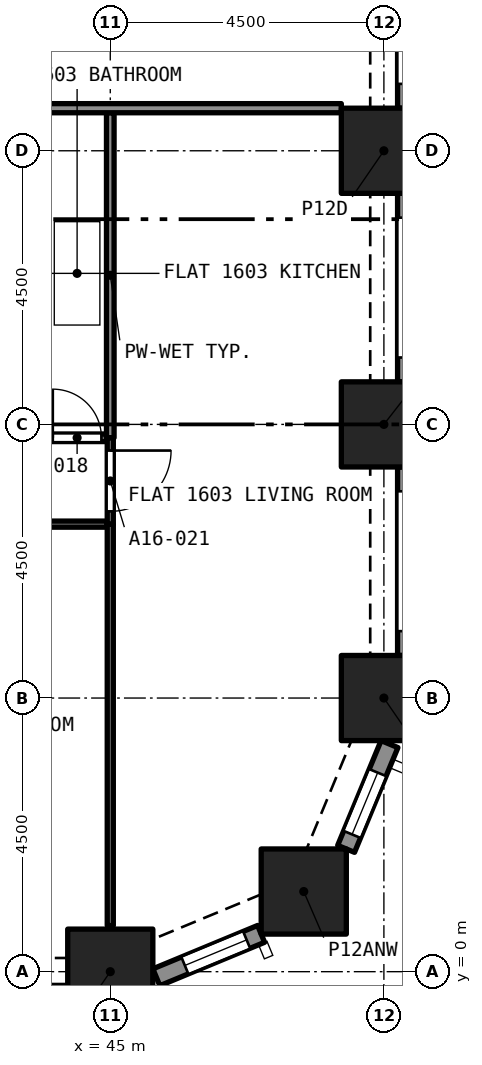
"""IFC4 building model, lengths in metres.
Left out: names, types, materials, properties, quantities, classifications, styles, units other than length and angle.
Written with IfcOpenShell. Run it as: python <this file> out.ifc"""

import sys

from ifc_helpers import new_model, si_unit, direction, frame, frame_2d, origin, origin_2d, place, context, subcontext, project, spatial, rectangle, extrude, element, fill, save


model = new_model("IFC4")
c1 = context("Model", 3, precision=1e-05, world=origin(), true_north=direction((0.0, 1.0)))
c2 = subcontext(c1, "Body", "Model", "MODEL_VIEW")
j1 = project(units=[si_unit("LENGTHUNIT", "METRE"), si_unit("PLANEANGLEUNIT", "RADIAN")], contexts=[c1])
p1 = place(None, origin())
s1 = spatial("IfcSite", under=j1, at=p1, CompositionType="ELEMENT")
p2 = place(p1, origin())
s2 = spatial("IfcBuilding", under=s1, at=p2, CompositionType="ELEMENT")
p3 = place(p2, frame((0.0, 0.0, 62.4)))
s3 = spatial("IfcBuildingStorey", under=s2, at=p3, CompositionType="ELEMENT", Elevation=62.4)
for number, where, z_axis, x_axis in (
    (1, (45.0, 0.0, 0.0), (0.0, 0.0, 1.0), (1.0, 0.0, 0.0)),
    (2, (48.182, 1.318, 0.0), (0.0, 0.0, 1.0), (1.0, 0.0, 0.0)),
    (3, (49.5, 4.5, 0.0), (0.0, 0.0, 1.0), (1.0, 0.0, 0.0)),
    (4, (49.5, 9.0, 0.0), (0.0, 0.0, 1.0), (1.0, 0.0, 0.0)),
    (5, (49.5, 13.5, 0.0), (0.0, 0.0, 1.0), (1.0, 0.0, 0.0)),
):
    element("IfcColumn", number, at=place(p3, frame(where, z_axis=z_axis, x_axis=x_axis)), inside=s3, PredefinedType="COLUMN", context=c2, shape_type="SweptSolid", body=[
        extrude(rectangle(XDim=1.4, YDim=1.4, at=origin_2d()), origin(), (0.0, 0.0, 1.0), 3.2),
    ])
p4 = place(p3, frame((47.48, 0.622, 0.0), z_axis=(0.0, 0.0, 1.0), x_axis=(-0.923903565336, -0.38262540684, 0.0)))
e6 = element("IfcWall", 6, at=p4, inside=s3, PredefinedType="SOLIDWALL", context=c2, shape_type="SweptSolid", body=[
    extrude(rectangle(XDim=1.865, YDim=0.3, at=frame_2d((0.933, 0.0))), origin(), (0.0, 0.0, 1.0), 3.2),
])
p5 = place(p4, frame((0.258, 0.0, 0.45)))
e7 = element("IfcOpeningElement", 7, at=p5, cuts=e6, PredefinedType="OPENING", context=c2, shape_type="SweptSolid", body=[
    extrude(rectangle(XDim=1.1, YDim=1.95, at=frame_2d((0.55, 0.975))), frame((0.0, 0.16, 0.0), z_axis=(0.0, -1.0, 0.0), x_axis=(1.0, 0.0, 0.0)), (0.0, 0.0, 1.0), 0.32),
])
p6 = place(p3, frame((49.592, 3.743, 0.0), z_axis=(0.0, 0.0, 1.0), x_axis=(-0.382737135771, -0.923857286003, 0.0)))
e8 = element("IfcWall", 8, at=p6, inside=s3, PredefinedType="SOLIDWALL", context=c2, shape_type="SweptSolid", body=[
    extrude(rectangle(XDim=1.865, YDim=0.3, at=frame_2d((0.933, 0.0))), origin(), (0.0, 0.0, 1.0), 3.2),
])
p7 = place(p6, frame((0.508, 0.0, 0.45)))
e9 = element("IfcOpeningElement", 9, at=p7, cuts=e8, PredefinedType="OPENING", context=c2, shape_type="SweptSolid", body=[
    extrude(rectangle(XDim=1.1, YDim=1.95, at=frame_2d((0.55, 0.975))), frame((0.0, 0.16, 0.0), z_axis=(0.0, -1.0, 0.0), x_axis=(1.0, 0.0, 0.0)), (0.0, 0.0, 1.0), 0.32),
])
p8 = place(p3, frame((49.875, 8.3, 0.0), z_axis=(0.0, 0.0, 1.0), x_axis=(0.0, -1.0, 0.0)))
e10 = element("IfcWall", 10, at=p8, inside=s3, PredefinedType="SOLIDWALL", context=c2, shape_type="SweptSolid", body=[
    extrude(rectangle(XDim=3.1, YDim=0.3, at=frame_2d((1.55, 0.0))), origin(), (0.0, 0.0, 1.0), 3.2),
])
p9 = place(p8, frame((0.4, 0.0, 0.45)))
e11 = element("IfcOpeningElement", 11, at=p9, cuts=e10, PredefinedType="OPENING", context=c2, shape_type="SweptSolid", body=[
    extrude(rectangle(XDim=2.3, YDim=1.95, at=frame_2d((1.15, 0.975))), frame((0.0, 0.16, 0.0), z_axis=(0.0, -1.0, 0.0), x_axis=(1.0, 0.0, 0.0)), (0.0, 0.0, 1.0), 0.32),
])
p10 = place(p3, frame((49.875, 12.8, 0.0), z_axis=(0.0, 0.0, 1.0), x_axis=(0.0, -1.0, 0.0)))
e12 = element("IfcWall", 12, at=p10, inside=s3, PredefinedType="SOLIDWALL", context=c2, shape_type="SweptSolid", body=[
    extrude(rectangle(XDim=3.1, YDim=0.3, at=frame_2d((1.55, 0.0))), origin(), (0.0, 0.0, 1.0), 3.2),
])
p11 = place(p10, frame((0.4, 0.0, 0.45)))
e13 = element("IfcOpeningElement", 13, at=p11, cuts=e12, PredefinedType="OPENING", context=c2, shape_type="SweptSolid", body=[
    extrude(rectangle(XDim=2.3, YDim=1.95, at=frame_2d((1.15, 0.975))), frame((0.0, 0.16, 0.0), z_axis=(0.0, -1.0, 0.0), x_axis=(1.0, 0.0, 0.0)), (0.0, 0.0, 1.0), 0.32),
])
p12 = place(p3, frame((49.875, 17.3, 0.0), z_axis=(0.0, 0.0, 1.0), x_axis=(0.0, -1.0, 0.0)))
e14 = element("IfcWall", 14, at=p12, inside=s3, PredefinedType="SOLIDWALL", context=c2, shape_type="SweptSolid", body=[
    extrude(rectangle(XDim=3.1, YDim=0.3, at=frame_2d((1.55, 0.0))), origin(), (0.0, 0.0, 1.0), 3.2),
])
p13 = place(p12, frame((0.4, 0.0, 0.45)))
e15 = element("IfcOpeningElement", 15, at=p13, cuts=e14, PredefinedType="OPENING", context=c2, shape_type="SweptSolid", body=[
    extrude(rectangle(XDim=2.3, YDim=1.95, at=frame_2d((1.15, 0.975))), frame((0.0, 0.16, 0.0), z_axis=(0.0, -1.0, 0.0), x_axis=(1.0, 0.0, 0.0)), (0.0, 0.0, 1.0), 0.32),
])
p14 = place(p3, frame((43.909, 8.78, 0.0), z_axis=(0.0, 0.0, 1.0), x_axis=(1.0, 0.0, 0.0)))
e16 = element("IfcWall", 16, at=p14, inside=s3, PredefinedType="PARTITIONING", context=c2, shape_type="SweptSolid", body=[
    extrude(rectangle(XDim=1.028, YDim=0.125, at=frame_2d((0.514, 0.0))), origin(), (0.0, 0.0, 1.0), 2.9),
])
p15 = place(p14, frame((0.146, 0.0, 0.0)))
e17 = element("IfcOpeningElement", 17, at=p15, cuts=e16, PredefinedType="OPENING", context=c2, shape_type="SweptSolid", body=[
    extrude(rectangle(XDim=0.8, YDim=2.1, at=frame_2d((0.4, 1.05))), frame((0.0, 0.073, 0.0), z_axis=(0.0, -1.0, 0.0), x_axis=(1.0, 0.0, 0.0)), (0.0, 0.0, 1.0), 0.145),
])
p16 = place(p3, frame((45.0, 8.78, 0.0), z_axis=(0.0, 0.0, 1.0), x_axis=(0.0, 1.0, 0.0)))
e18 = element("IfcWall", 18, at=p16, inside=s3, PredefinedType="PARTITIONING", context=c2, shape_type="SweptSolid", body=[
    extrude(rectangle(XDim=5.345, YDim=0.125, at=frame_2d((2.672, 0.0))), origin(), (0.0, 0.0, 1.0), 2.9),
])
p17 = place(p3, frame((44.95, 7.36, 0.0), z_axis=(0.0, 0.0, 1.0), x_axis=(-1.0, 0.0, 0.0)))
e19 = element("IfcWall", 19, at=p17, inside=s3, PredefinedType="PARTITIONING", context=c2, shape_type="SweptSolid", body=[
    extrude(rectangle(XDim=4.35, YDim=0.1, at=frame_2d((2.175, 0.0))), origin(), (0.0, 0.0, 1.0), 2.9),
])
p18 = place(p17, frame((1.75, 0.0, 0.0)))
e20 = element("IfcOpeningElement", 20, at=p18, cuts=e19, PredefinedType="OPENING", context=c2, shape_type="SweptSolid", body=[
    extrude(rectangle(XDim=0.9, YDim=2.1, at=frame_2d((0.45, 1.05))), frame((0.0, 0.06, 0.0), z_axis=(0.0, -1.0, 0.0), x_axis=(1.0, 0.0, 0.0)), (0.0, 0.0, 1.0), 0.12),
])
p19 = place(p3, frame((45.0, 0.758, 0.0), z_axis=(0.0, 0.0, 1.0), x_axis=(0.0, 1.0, 0.0)))
e21 = element("IfcWall", 21, at=p19, inside=s3, PredefinedType="PARTITIONING", context=c2, shape_type="SweptSolid", body=[
    extrude(rectangle(XDim=6.603, YDim=0.1, at=frame_2d((3.301, 0.0))), origin(), (0.0, 0.0, 1.0), 2.9),
])
p20 = place(p3, frame((45.0, 8.78, 0.0), z_axis=(0.0, 0.0, 1.0), x_axis=(0.0, -1.0, 0.0)))
e22 = element("IfcWall", 22, at=p20, inside=s3, PredefinedType="PARTITIONING", context=c2, shape_type="SweptSolid", body=[
    extrude(rectangle(XDim=1.42, YDim=0.1, at=frame_2d((0.71, 0.0))), origin(), (0.0, 0.0, 1.0), 2.9),
])
p21 = place(p20, frame((0.21, 0.0, 0.0)))
e23 = element("IfcOpeningElement", 23, at=p21, cuts=e22, PredefinedType="OPENING", context=c2, shape_type="SweptSolid", body=[
    extrude(rectangle(XDim=1.0, YDim=2.1, at=frame_2d((0.5, 1.05))), frame((0.0, 0.06, 0.0), z_axis=(0.0, -1.0, 0.0), x_axis=(1.0, 0.0, 0.0)), (0.0, 0.0, 1.0), 0.12),
])
p22 = place(p3, frame((42.6, 14.2, 0.0), z_axis=(0.0, 0.0, 1.0), x_axis=(1.0, 0.0, 0.0)))
e24 = element("IfcWall", 24, at=p22, inside=s3, PredefinedType="PARTITIONING", context=c2, shape_type="SweptSolid", body=[
    extrude(rectangle(XDim=6.2, YDim=0.15, at=frame_2d((3.1, 0.0))), origin(), (0.0, 0.0, 1.0), 2.9),
])
p23 = place(p5, origin())
e25 = element("IfcWindow", 25, at=p23, inside=s3, PartitioningType="SINGLE_PANEL", PredefinedType="WINDOW", context=c2, shape_type="SweptSolid", body=[
    extrude(rectangle(XDim=1.1, YDim=1.95, at=frame_2d((0.55, 0.975))), frame((0.0, 0.03, 0.0), z_axis=(0.0, -1.0, 0.0), x_axis=(1.0, 0.0, 0.0)), (0.0, 0.0, 1.0), 0.06),
])
fill(e7, e25)
p24 = place(p7, origin())
e26 = element("IfcWindow", 26, at=p24, inside=s3, PartitioningType="SINGLE_PANEL", PredefinedType="WINDOW", context=c2, shape_type="SweptSolid", body=[
    extrude(rectangle(XDim=1.1, YDim=1.95, at=frame_2d((0.55, 0.975))), frame((0.0, 0.03, 0.0), z_axis=(0.0, -1.0, 0.0), x_axis=(1.0, 0.0, 0.0)), (0.0, 0.0, 1.0), 0.06),
])
fill(e9, e26)
p25 = place(p15, origin())
e27 = element("IfcDoor", 27, at=p25, inside=s3, OperationType="SINGLE_SWING_RIGHT", PredefinedType="DOOR", context=c2, shape_type="SweptSolid", body=[
    extrude(rectangle(XDim=0.8, YDim=2.1, at=frame_2d((0.4, 1.05))), frame((0.0, 0.025, 0.0), z_axis=(0.0, -1.0, 0.0), x_axis=(1.0, 0.0, 0.0)), (0.0, 0.0, 1.0), 0.05),
])
fill(e17, e27)
p26 = place(p21, origin())
e28 = element("IfcDoor", 28, at=p26, inside=s3, OperationType="SINGLE_SWING_LEFT", PredefinedType="DOOR", context=c2, shape_type="SweptSolid", body=[
    extrude(rectangle(XDim=1.0, YDim=2.1, at=frame_2d((0.5, 1.05))), frame((0.0, 0.025, 0.0), z_axis=(0.0, -1.0, 0.0), x_axis=(1.0, 0.0, 0.0)), (0.0, 0.0, 1.0), 0.05),
])
fill(e23, e28)
save(model, sys.argv[1])
